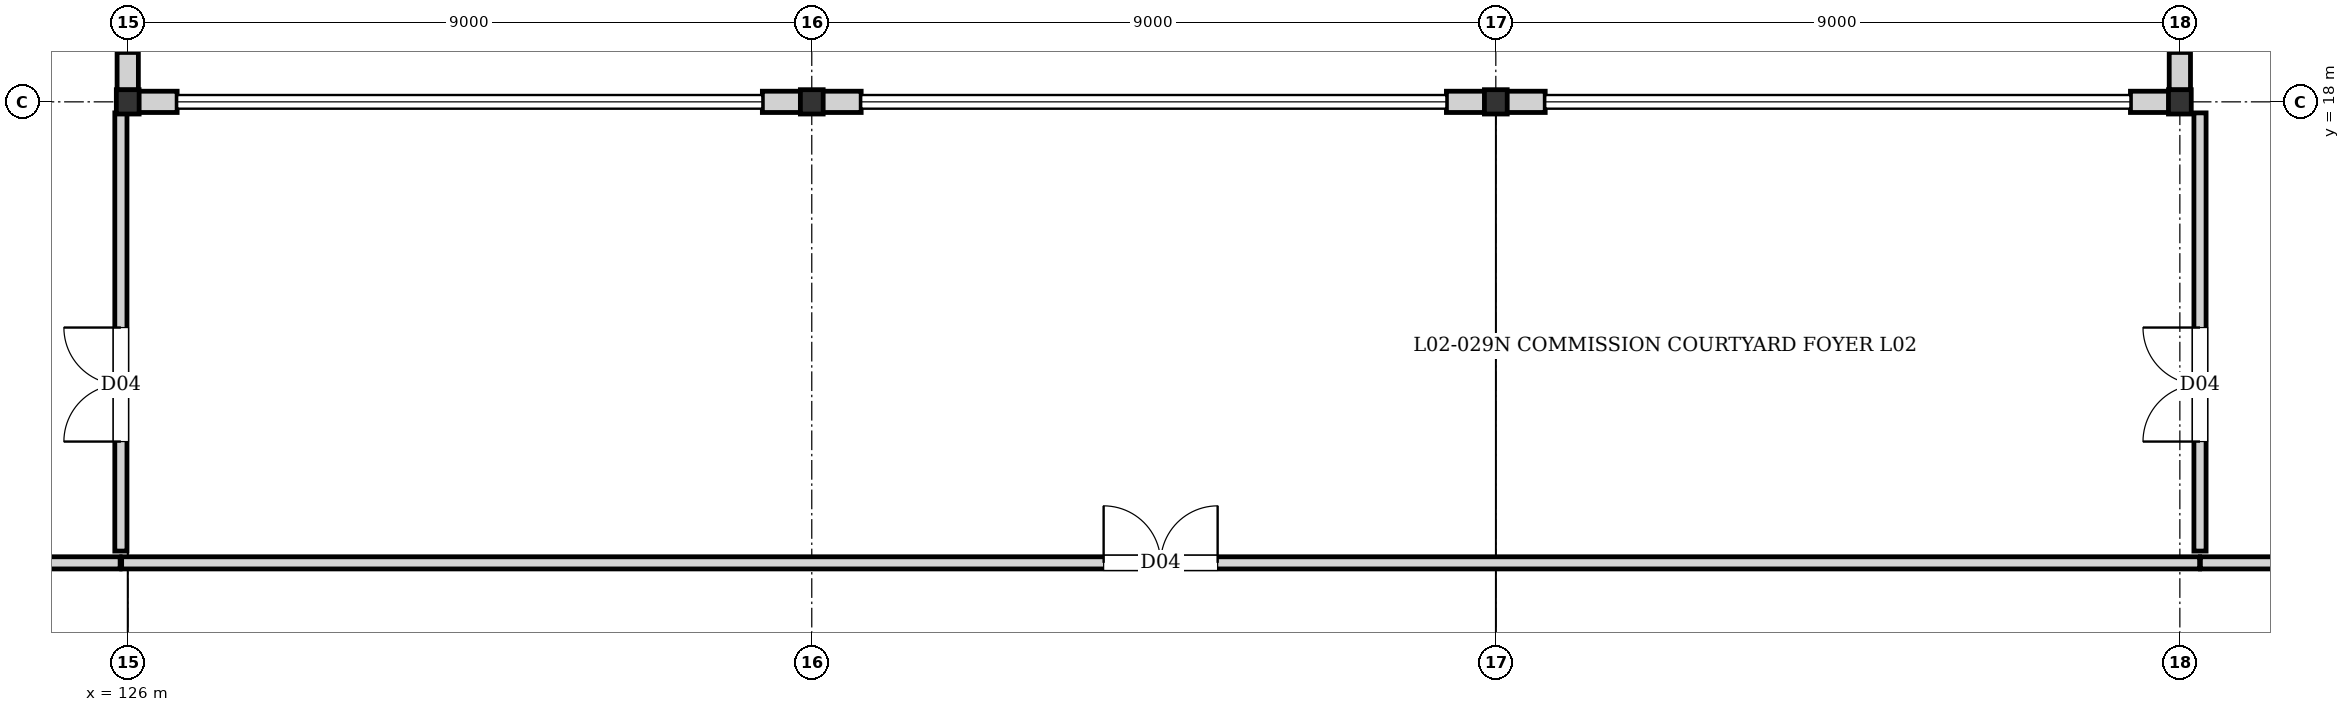
"""IFC4 building model, lengths in metres.
Left out: names, types, materials, properties, quantities, classifications, styles, units other than length and angle.
Written with IfcOpenShell. Run it as: python <this file> out.ifc"""

import sys

from ifc_helpers import new_model, si_unit, direction, frame, frame_2d, origin, origin_2d, place, context, subcontext, project, spatial, rectangle, i_section, extrude, element, fill, save


model = new_model("IFC4")
c1 = context("Model", 3, precision=1e-05, world=origin(), true_north=direction((0.0, 1.0)))
c2 = subcontext(c1, "Body", "Model", "MODEL_VIEW")
j1 = project(units=[si_unit("LENGTHUNIT", "METRE"), si_unit("PLANEANGLEUNIT", "RADIAN")], contexts=[c1])
p1 = place(None, origin())
s1 = spatial("IfcSite", under=j1, at=p1, CompositionType="ELEMENT")
p2 = place(p1, origin())
s2 = spatial("IfcBuilding", under=s1, at=p2, CompositionType="ELEMENT")
p3 = place(p2, frame((0.0, 0.0, 8.16)))
s3 = spatial("IfcBuildingStorey", under=s2, at=p3, CompositionType="ELEMENT", Elevation=8.16)
for number, where, z_axis, x_axis in (
    (1, (126.0, 18.0, 0.0), (0.0, 0.0, 1.0), (1.0, 0.0, 0.0)),
    (2, (135.0, 18.0, 0.0), (0.0, 0.0, 1.0), (1.0, 0.0, 0.0)),
    (3, (144.0, 18.0, 0.0), (0.0, 0.0, 1.0), (1.0, 0.0, 0.0)),
    (4, (153.0, 18.0, 0.0), (0.0, 0.0, 1.0), (1.0, 0.0, 0.0)),
):
    element("IfcColumn", number, at=place(p3, frame(where, z_axis=z_axis, x_axis=x_axis)), inside=s3, PredefinedType="COLUMN", context=c2, shape_type="SweptSolid", body=[
        extrude(i_section(OverallWidth=0.3, OverallDepth=0.32, WebThickness=0.011, FlangeThickness=0.021, at=origin_2d()), origin(), (0.0, 0.0, 1.0), 3.36),
    ])
p4 = place(p3, frame((126.0, 18.65, 0.0), z_axis=(0.0, 0.0, 1.0), x_axis=(0.0, -1.0, 0.0)))
e5 = element("IfcWall", 5, at=p4, inside=s3, PredefinedType="SOLIDWALL", context=c2, shape_type="SweptSolid", body=[
    extrude(rectangle(XDim=0.495, YDim=0.28, at=frame_2d((0.248, 0.0))), origin(), (0.0, 0.0, 1.0), 3.11),
])
for number, where, z_axis, x_axis in (
    (6, (126.0, 18.0, 0.0), (0.0, 0.0, 1.0), (1.0, 0.0, 0.0)),
    (7, (134.35, 18.0, 0.0), (0.0, 0.0, 1.0), (1.0, 0.0, 0.0)),
):
    element("IfcWall", number, at=place(p3, frame(where, z_axis=z_axis, x_axis=x_axis)), inside=s3, PredefinedType="SOLIDWALL", context=c2, shape_type="SweptSolid", body=[
        extrude(rectangle(XDim=0.65, YDim=0.28, at=frame_2d((0.325, 0.0))), origin(), (0.0, 0.0, 1.0), 2.74),
    ])
for number, where, z_axis, x_axis in (
    (8, (135.0, 18.0, 0.0), (0.0, 0.0, 1.0), (1.0, 0.0, 0.0)),
    (9, (143.35, 18.0, 0.0), (0.0, 0.0, 1.0), (1.0, 0.0, 0.0)),
):
    element("IfcWall", number, at=place(p3, frame(where, z_axis=z_axis, x_axis=x_axis)), inside=s3, PredefinedType="SOLIDWALL", context=c2, shape_type="SweptSolid", body=[
        extrude(rectangle(XDim=0.65, YDim=0.28, at=frame_2d((0.325, 0.0))), origin(), (0.0, 0.0, 1.0), 2.7),
    ])
for number, where, z_axis, x_axis in (
    (10, (144.0, 18.0, 0.0), (0.0, 0.0, 1.0), (1.0, 0.0, 0.0)),
    (11, (152.35, 18.0, 0.0), (0.0, 0.0, 1.0), (1.0, 0.0, 0.0)),
):
    element("IfcWall", number, at=place(p3, frame(where, z_axis=z_axis, x_axis=x_axis)), inside=s3, PredefinedType="SOLIDWALL", context=c2, shape_type="SweptSolid", body=[
        extrude(rectangle(XDim=0.65, YDim=0.28, at=frame_2d((0.325, 0.0))), origin(), (0.0, 0.0, 1.0), 2.87),
    ])
p5 = place(p3, frame((153.0, 18.155, 0.0), z_axis=(0.0, 0.0, 1.0), x_axis=(0.0, 1.0, 0.0)))
e12 = element("IfcWall", 12, at=p5, inside=s3, PredefinedType="SOLIDWALL", context=c2, shape_type="SweptSolid", body=[
    extrude(rectangle(XDim=0.495, YDim=0.28, at=frame_2d((0.248, 0.0))), origin(), (0.0, 0.0, 1.0), 3.11),
])
p6 = place(p3, frame((153.27, 11.935, 0.0), z_axis=(0.0, 0.0, 1.0), x_axis=(1.0, 0.0, 0.0)))
e13 = element("IfcWall", 13, at=p6, inside=s3, PredefinedType="PARTITIONING", context=c2, shape_type="SweptSolid", body=[
    extrude(rectangle(XDim=2.86, YDim=0.16, at=frame_2d((1.43, 0.0))), origin(), (0.0, 0.0, 1.0), 3.11),
])
p7 = place(p6, frame((1.023, 0.0, 0.0)))
e14 = element("IfcOpeningElement", 14, at=p7, cuts=e13, PredefinedType="OPENING", context=c2, shape_type="SweptSolid", body=[
    extrude(rectangle(XDim=1.5, YDim=2.1, at=frame_2d((0.75, 1.05))), frame((0.0, 0.09, 0.0), z_axis=(0.0, -1.0, 0.0), x_axis=(1.0, 0.0, 0.0)), (0.0, 0.0, 1.0), 0.18),
])
p8 = place(p3, frame((125.92, 11.935, 0.0), z_axis=(0.0, 0.0, 1.0), x_axis=(1.0, 0.0, 0.0)))
e15 = element("IfcWall", 15, at=p8, inside=s3, PredefinedType="PARTITIONING", context=c2, shape_type="SweptSolid", body=[
    extrude(rectangle(XDim=27.34, YDim=0.16, at=frame_2d((13.67, 0.0))), origin(), (0.0, 0.0, 1.0), 3.11),
])
p9 = place(p8, frame((12.92, 0.0, 0.0)))
e16 = element("IfcOpeningElement", 16, at=p9, cuts=e15, PredefinedType="OPENING", context=c2, shape_type="SweptSolid", body=[
    extrude(rectangle(XDim=1.5, YDim=2.1, at=frame_2d((0.75, 1.05))), frame((0.0, 0.09, 0.0), z_axis=(0.0, -1.0, 0.0), x_axis=(1.0, 0.0, 0.0)), (0.0, 0.0, 1.0), 0.18),
])
p10 = place(p3, frame((122.065, 11.935, 0.0), z_axis=(0.0, 0.0, 1.0), x_axis=(1.0, 0.0, 0.0)))
e17 = element("IfcWall", 17, at=p10, inside=s3, PredefinedType="PARTITIONING", context=c2, shape_type="SweptSolid", body=[
    extrude(rectangle(XDim=3.835, YDim=0.16, at=frame_2d((1.917, 0.0))), origin(), (0.0, 0.0, 1.0), 3.11),
])
p11 = place(p10, frame((0.685, 0.0, 0.0)))
e18 = element("IfcOpeningElement", 18, at=p11, cuts=e17, PredefinedType="OPENING", context=c2, shape_type="SweptSolid", body=[
    extrude(rectangle(XDim=1.5, YDim=2.1, at=frame_2d((0.75, 1.05))), frame((0.0, 0.09, 0.0), z_axis=(0.0, -1.0, 0.0), x_axis=(1.0, 0.0, 0.0)), (0.0, 0.0, 1.0), 0.18),
])
p12 = place(p3, frame((153.265, 12.09, 0.0), z_axis=(0.0, 0.0, 1.0), x_axis=(0.0, 1.0, 0.0)))
e19 = element("IfcWall", 19, at=p12, inside=s3, PredefinedType="PARTITIONING", context=c2, shape_type="SweptSolid", body=[
    extrude(rectangle(XDim=5.765, YDim=0.16, at=frame_2d((2.882, 0.0))), origin(), (0.0, 0.0, 1.0), 3.11),
])
p13 = place(p12, frame((1.441, 0.0, 0.0)))
e20 = element("IfcOpeningElement", 20, at=p13, cuts=e19, PredefinedType="OPENING", context=c2, shape_type="SweptSolid", body=[
    extrude(rectangle(XDim=1.5, YDim=2.1, at=frame_2d((0.75, 1.05))), frame((0.0, 0.09, 0.0), z_axis=(0.0, -1.0, 0.0), x_axis=(1.0, 0.0, 0.0)), (0.0, 0.0, 1.0), 0.18),
])
p14 = place(p3, frame((125.91, 12.09, 0.0), z_axis=(0.0, 0.0, 1.0), x_axis=(0.0, 1.0, 0.0)))
e21 = element("IfcWall", 21, at=p14, inside=s3, PredefinedType="PARTITIONING", context=c2, shape_type="SweptSolid", body=[
    extrude(rectangle(XDim=5.765, YDim=0.16, at=frame_2d((2.882, 0.0))), origin(), (0.0, 0.0, 1.0), 2.51),
])
p15 = place(p14, frame((1.441, 0.0, 0.0)))
e22 = element("IfcOpeningElement", 22, at=p15, cuts=e21, PredefinedType="OPENING", context=c2, shape_type="SweptSolid", body=[
    extrude(rectangle(XDim=1.5, YDim=2.1, at=frame_2d((0.75, 1.05))), frame((0.0, 0.09, 0.0), z_axis=(0.0, -1.0, 0.0), x_axis=(1.0, 0.0, 0.0)), (0.0, 0.0, 1.0), 0.18),
])
p16 = place(p9, origin())
e23 = element("IfcDoor", 23, at=p16, inside=s3, OperationType="DOUBLE_DOOR_SINGLE_SWING", PredefinedType="DOOR", context=c2, shape_type="SweptSolid", body=[
    extrude(rectangle(XDim=1.5, YDim=2.1, at=frame_2d((0.75, 1.05))), frame((0.0, 0.025, 0.0), z_axis=(0.0, -1.0, 0.0), x_axis=(1.0, 0.0, 0.0)), (0.0, 0.0, 1.0), 0.05),
])
fill(e16, e23)
p17 = place(p13, origin())
e24 = element("IfcDoor", 24, at=p17, inside=s3, OperationType="DOUBLE_DOOR_SINGLE_SWING", PredefinedType="DOOR", context=c2, shape_type="SweptSolid", body=[
    extrude(rectangle(XDim=1.5, YDim=2.1, at=frame_2d((0.75, 1.05))), frame((0.0, 0.025, 0.0), z_axis=(0.0, -1.0, 0.0), x_axis=(1.0, 0.0, 0.0)), (0.0, 0.0, 1.0), 0.05),
])
fill(e20, e24)
p18 = place(p15, origin())
e25 = element("IfcDoor", 25, at=p18, inside=s3, OperationType="DOUBLE_DOOR_SINGLE_SWING", PredefinedType="DOOR", context=c2, shape_type="SweptSolid", body=[
    extrude(rectangle(XDim=1.5, YDim=2.1, at=frame_2d((0.75, 1.05))), frame((0.0, 0.025, 0.0), z_axis=(0.0, -1.0, 0.0), x_axis=(1.0, 0.0, 0.0)), (0.0, 0.0, 1.0), 0.05),
])
fill(e22, e25)
save(model, sys.argv[1])
